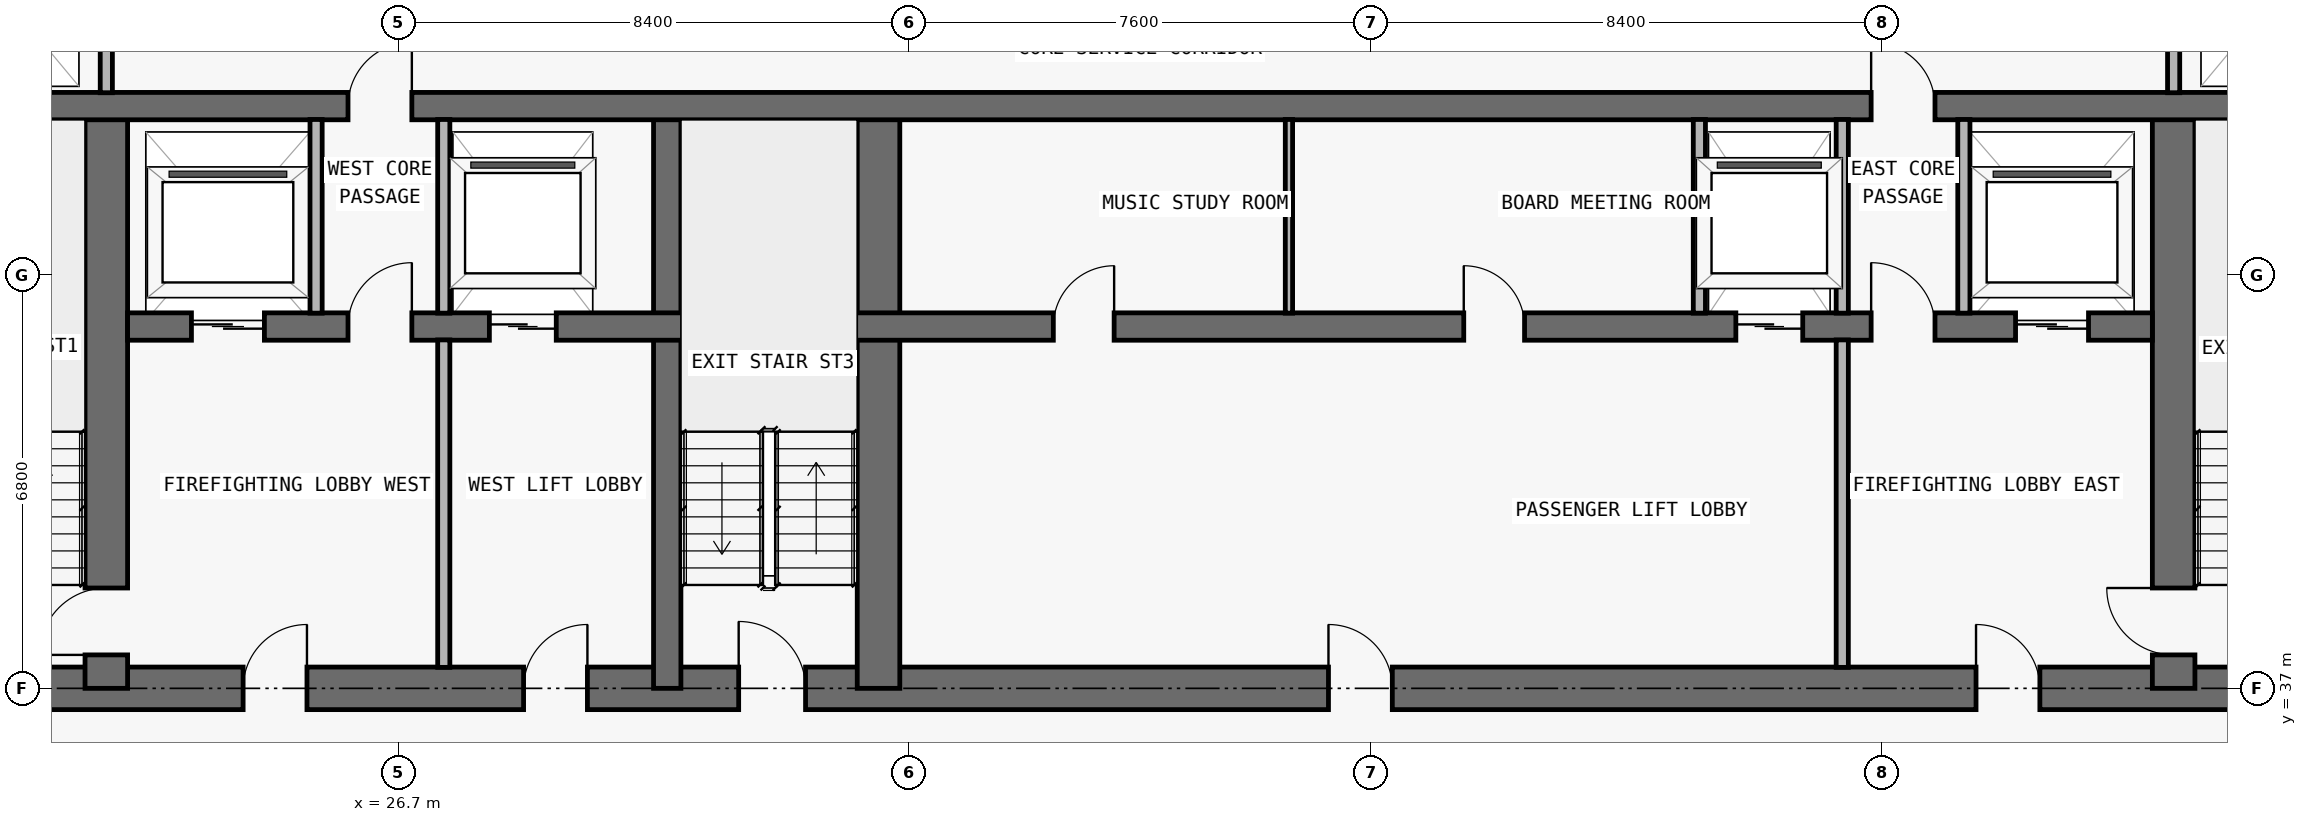
"""IFC4 building model, lengths in metres.
Left out: names, types, materials, properties, quantities, classifications, styles, units other than length and angle.
Written with IfcOpenShell. Run it as: python <this file> out.ifc"""

import sys

from ifc_helpers import new_model, si_unit, direction, frame, frame_2d, origin, place, context, subcontext, project, spatial, rectangle, extrude, element, fill, save


model = new_model("IFC4")
c1 = context("Model", 3, precision=1e-05, world=origin(), true_north=direction((0.0, 1.0)))
c2 = subcontext(c1, "Body", "Model", "MODEL_VIEW")
j1 = project(units=[si_unit("LENGTHUNIT", "METRE"), si_unit("PLANEANGLEUNIT", "RADIAN")], contexts=[c1])
p1 = place(None, origin())
s1 = spatial("IfcSite", under=j1, at=p1, CompositionType="ELEMENT")
p2 = place(p1, origin())
s2 = spatial("IfcBuilding", under=s1, at=p2, CompositionType="ELEMENT")
p3 = place(p2, frame((0.0, 0.0, 211.5)))
s3 = spatial("IfcBuildingStorey", under=s2, at=p3, CompositionType="ELEMENT", Elevation=211.5)
p4 = place(p3, frame((17.95, 37.0, 0.0), z_axis=(0.0, 0.0, 1.0), x_axis=(1.0, 0.0, 0.0)))
e1 = element("IfcWall", 1, at=p4, inside=s3, PredefinedType="SHEAR", context=c2, shape_type="SweptSolid", body=[
    extrude(rectangle(XDim=41.9, YDim=0.7, at=frame_2d((20.95, 0.0))), origin(), (0.0, 0.0, 1.0), 3.05),
])
p5 = place(p4, frame((14.35, 0.0, 0.0)))
e2 = element("IfcOpeningElement", 2, at=p5, cuts=e1, PredefinedType="OPENING", context=c2, shape_type="SweptSolid", body=[
    extrude(rectangle(XDim=1.1, YDim=2.15, at=frame_2d((0.55, 1.075))), frame((0.0, 0.36, 0.0), z_axis=(0.0, -1.0, 0.0), x_axis=(1.0, 0.0, 0.0)), (0.0, 0.0, 1.0), 0.72),
])
p6 = place(p4, frame((6.2, 0.0, 0.0)))
e3 = element("IfcOpeningElement", 3, at=p6, cuts=e1, PredefinedType="OPENING", context=c2, shape_type="SweptSolid", body=[
    extrude(rectangle(XDim=1.05, YDim=2.15, at=frame_2d((0.525, 1.075))), frame((0.0, 0.36, 0.0), z_axis=(0.0, -1.0, 0.0), x_axis=(1.0, 0.0, 0.0)), (0.0, 0.0, 1.0), 0.72),
])
p7 = place(p4, frame((34.7, 0.0, 0.0)))
e4 = element("IfcOpeningElement", 4, at=p7, cuts=e1, PredefinedType="OPENING", context=c2, shape_type="SweptSolid", body=[
    extrude(rectangle(XDim=1.05, YDim=2.15, at=frame_2d((0.525, 1.075))), frame((0.0, 0.36, 0.0), z_axis=(0.0, -1.0, 0.0), x_axis=(1.0, 0.0, 0.0)), (0.0, 0.0, 1.0), 0.72),
])
p8 = place(p4, frame((10.812, 0.0, 0.0)))
e5 = element("IfcOpeningElement", 5, at=p8, cuts=e1, PredefinedType="OPENING", context=c2, shape_type="SweptSolid", body=[
    extrude(rectangle(XDim=1.05, YDim=2.15, at=frame_2d((0.525, 1.075))), frame((0.0, 0.36, 0.0), z_axis=(0.0, -1.0, 0.0), x_axis=(1.0, 0.0, 0.0)), (0.0, 0.0, 1.0), 0.72),
])
p9 = place(p4, frame((24.05, 0.0, 0.0)))
e6 = element("IfcOpeningElement", 6, at=p9, cuts=e1, PredefinedType="OPENING", context=c2, shape_type="SweptSolid", body=[
    extrude(rectangle(XDim=1.05, YDim=2.15, at=frame_2d((0.525, 1.075))), frame((0.0, 0.36, 0.0), z_axis=(0.0, -1.0, 0.0), x_axis=(1.0, 0.0, 0.0)), (0.0, 0.0, 1.0), 0.72),
])
p10 = place(p3, frame((21.9, 37.0, 0.0), z_axis=(0.0, 0.0, 1.0), x_axis=(0.0, 1.0, 0.0)))
e7 = element("IfcWall", 7, at=p10, inside=s3, PredefinedType="SHEAR", context=c2, shape_type="SweptSolid", body=[
    extrude(rectangle(XDim=9.575, YDim=0.7, at=frame_2d((4.788, 0.0))), origin(), (0.0, 0.0, 1.0), 3.05),
])
p11 = place(p10, frame((0.55, 0.0, 0.0)))
e8 = element("IfcOpeningElement", 8, at=p11, cuts=e7, PredefinedType="OPENING", context=c2, shape_type="SweptSolid", body=[
    extrude(rectangle(XDim=1.1, YDim=2.15, at=frame_2d((0.55, 1.075))), frame((0.0, 0.36, 0.0), z_axis=(0.0, -1.0, 0.0), x_axis=(1.0, 0.0, 0.0)), (0.0, 0.0, 1.0), 0.72),
])
p12 = place(p3, frame((55.9, 37.0, 0.0), z_axis=(0.0, 0.0, 1.0), x_axis=(0.0, 1.0, 0.0)))
e9 = element("IfcWall", 9, at=p12, inside=s3, PredefinedType="SHEAR", context=c2, shape_type="SweptSolid", body=[
    extrude(rectangle(XDim=9.575, YDim=0.7, at=frame_2d((4.788, 0.0))), origin(), (0.0, 0.0, 1.0), 3.05),
])
p13 = place(p12, frame((0.55, 0.0, 0.0)))
e10 = element("IfcOpeningElement", 10, at=p13, cuts=e9, PredefinedType="OPENING", context=c2, shape_type="SweptSolid", body=[
    extrude(rectangle(XDim=1.1, YDim=2.15, at=frame_2d((0.55, 1.075))), frame((0.0, 0.36, 0.0), z_axis=(0.0, -1.0, 0.0), x_axis=(1.0, 0.0, 0.0)), (0.0, 0.0, 1.0), 0.72),
])
p14 = place(p3, frame((31.125, 37.0, 0.0), z_axis=(0.0, 0.0, 1.0), x_axis=(0.0, 1.0, 0.0)))
e11 = element("IfcWall", 11, at=p14, inside=s3, PredefinedType="SHEAR", context=c2, shape_type="SweptSolid", body=[
    extrude(rectangle(XDim=9.575, YDim=0.45, at=frame_2d((4.788, 0.0))), origin(), (0.0, 0.0, 1.0), 3.05),
])
p15 = place(p3, frame((34.6, 37.0, 0.0), z_axis=(0.0, 0.0, 1.0), x_axis=(0.0, 1.0, 0.0)))
e12 = element("IfcWall", 12, at=p15, inside=s3, PredefinedType="SHEAR", context=c2, shape_type="SweptSolid", body=[
    extrude(rectangle(XDim=9.575, YDim=0.7, at=frame_2d((4.788, 0.0))), origin(), (0.0, 0.0, 1.0), 3.05),
])
p16 = place(p3, frame((22.25, 42.95, 0.0), z_axis=(0.0, 0.0, 1.0), x_axis=(1.0, 0.0, 0.0)))
e13 = element("IfcWall", 13, at=p16, inside=s3, PredefinedType="SHEAR", context=c2, shape_type="SweptSolid", body=[
    extrude(rectangle(XDim=33.3, YDim=0.45, at=frame_2d((16.65, 0.0))), origin(), (0.0, 0.0, 1.0), 3.05),
])
p17 = place(p16, frame((1.05, 0.0, 0.0)))
e14 = element("IfcOpeningElement", 14, at=p17, cuts=e13, PredefinedType="OPENING", context=c2, shape_type="SweptSolid", body=[
    extrude(rectangle(XDim=1.2, YDim=2.2, at=frame_2d((0.6, 1.1))), frame((0.0, 0.235, 0.0), z_axis=(0.0, -1.0, 0.0), x_axis=(1.0, 0.0, 0.0)), (0.0, 0.0, 1.0), 0.47),
])
p18 = place(p16, frame((31.05, 0.0, 0.0)))
e15 = element("IfcOpeningElement", 15, at=p18, cuts=e13, PredefinedType="OPENING", context=c2, shape_type="SweptSolid", body=[
    extrude(rectangle(XDim=1.2, YDim=2.2, at=frame_2d((0.6, 1.1))), frame((0.0, 0.235, 0.0), z_axis=(0.0, -1.0, 0.0), x_axis=(1.0, 0.0, 0.0)), (0.0, 0.0, 1.0), 0.47),
])
p19 = place(p16, frame((26.45, 0.0, 0.0)))
e16 = element("IfcOpeningElement", 16, at=p19, cuts=e13, PredefinedType="OPENING", context=c2, shape_type="SweptSolid", body=[
    extrude(rectangle(XDim=1.1, YDim=2.2, at=frame_2d((0.55, 1.1))), frame((0.0, 0.235, 0.0), z_axis=(0.0, -1.0, 0.0), x_axis=(1.0, 0.0, 0.0)), (0.0, 0.0, 1.0), 0.47),
])
p20 = place(p16, frame((5.95, 0.0, 0.0)))
e17 = element("IfcOpeningElement", 17, at=p20, cuts=e13, PredefinedType="OPENING", context=c2, shape_type="SweptSolid", body=[
    extrude(rectangle(XDim=1.1, YDim=2.2, at=frame_2d((0.55, 1.1))), frame((0.0, 0.235, 0.0), z_axis=(0.0, -1.0, 0.0), x_axis=(1.0, 0.0, 0.0)), (0.0, 0.0, 1.0), 0.47),
])
p21 = place(p16, frame((3.625, 0.0, 0.0)))
e18 = element("IfcOpeningElement", 18, at=p21, cuts=e13, PredefinedType="OPENING", context=c2, shape_type="SweptSolid", body=[
    extrude(rectangle(XDim=1.05, YDim=2.15, at=frame_2d((0.525, 1.075))), frame((0.0, 0.235, 0.0), z_axis=(0.0, -1.0, 0.0), x_axis=(1.0, 0.0, 0.0)), (0.0, 0.0, 1.0), 0.47),
])
p22 = place(p16, frame((28.675, 0.0, 0.0)))
e19 = element("IfcOpeningElement", 19, at=p22, cuts=e13, PredefinedType="OPENING", context=c2, shape_type="SweptSolid", body=[
    extrude(rectangle(XDim=1.05, YDim=2.15, at=frame_2d((0.525, 1.075))), frame((0.0, 0.235, 0.0), z_axis=(0.0, -1.0, 0.0), x_axis=(1.0, 0.0, 0.0)), (0.0, 0.0, 1.0), 0.47),
])
p23 = place(p16, frame((15.225, 0.0, 0.0)))
e20 = element("IfcOpeningElement", 20, at=p23, cuts=e13, PredefinedType="OPENING", context=c2, shape_type="SweptSolid", body=[
    extrude(rectangle(XDim=1.0, YDim=2.2, at=frame_2d((0.5, 1.1))), frame((0.0, 0.235, 0.0), z_axis=(0.0, -1.0, 0.0), x_axis=(1.0, 0.0, 0.0)), (0.0, 0.0, 1.0), 0.47),
])
p24 = place(p16, frame((21.975, 0.0, 0.0)))
e21 = element("IfcOpeningElement", 21, at=p24, cuts=e13, PredefinedType="OPENING", context=c2, shape_type="SweptSolid", body=[
    extrude(rectangle(XDim=1.0, YDim=2.2, at=frame_2d((0.5, 1.1))), frame((0.0, 0.235, 0.0), z_axis=(0.0, -1.0, 0.0), x_axis=(1.0, 0.0, 0.0)), (0.0, 0.0, 1.0), 0.47),
])
p25 = place(p3, frame((18.3, 46.575, 0.0), z_axis=(0.0, 0.0, 1.0), x_axis=(1.0, 0.0, 0.0)))
e22 = element("IfcWall", 22, at=p25, inside=s3, PredefinedType="SHEAR", context=c2, shape_type="SweptSolid", body=[
    extrude(rectangle(XDim=41.2, YDim=0.45, at=frame_2d((20.6, 0.0))), origin(), (0.0, 0.0, 1.0), 3.05),
])
p26 = place(p25, frame((7.575, 0.0, 0.0)))
e23 = element("IfcOpeningElement", 23, at=p26, cuts=e22, PredefinedType="OPENING", context=c2, shape_type="SweptSolid", body=[
    extrude(rectangle(XDim=1.05, YDim=2.15, at=frame_2d((0.525, 1.075))), frame((0.0, 0.235, 0.0), z_axis=(0.0, -1.0, 0.0), x_axis=(1.0, 0.0, 0.0)), (0.0, 0.0, 1.0), 0.47),
])
p27 = place(p25, frame((32.625, 0.0, 0.0)))
e24 = element("IfcOpeningElement", 24, at=p27, cuts=e22, PredefinedType="OPENING", context=c2, shape_type="SweptSolid", body=[
    extrude(rectangle(XDim=1.05, YDim=2.15, at=frame_2d((0.525, 1.075))), frame((0.0, 0.235, 0.0), z_axis=(0.0, -1.0, 0.0), x_axis=(1.0, 0.0, 0.0)), (0.0, 0.0, 1.0), 0.47),
])
p28 = place(p3, frame((21.9, 46.795, 0.0), z_axis=(0.0, 0.0, 1.0), x_axis=(0.0, 1.0, 0.0)))
e25 = element("IfcWall", 25, at=p28, inside=s3, PredefinedType="PARTITIONING", context=c2, shape_type="SweptSolid", body=[
    extrude(rectangle(XDim=3.16, YDim=0.2, at=frame_2d((1.58, 0.0))), origin(), (0.0, 0.0, 1.0), 3.05),
])
p29 = place(p3, frame((25.35, 43.17, 0.0), z_axis=(0.0, 0.0, 1.0), x_axis=(0.0, 1.0, 0.0)))
e26 = element("IfcWall", 26, at=p29, inside=s3, PredefinedType="PARTITIONING", context=c2, shape_type="SweptSolid", body=[
    extrude(rectangle(XDim=3.185, YDim=0.2, at=frame_2d((1.593, 0.0))), origin(), (0.0, 0.0, 1.0), 3.05),
])
p30 = place(p3, frame((27.45, 37.345, 0.0), z_axis=(0.0, 0.0, 1.0), x_axis=(0.0, 1.0, 0.0)))
e27 = element("IfcWall", 27, at=p30, inside=s3, PredefinedType="PARTITIONING", context=c2, shape_type="SweptSolid", body=[
    extrude(rectangle(XDim=5.385, YDim=0.2, at=frame_2d((2.692, 0.0))), origin(), (0.0, 0.0, 1.0), 3.05),
])
p31 = place(p3, frame((27.45, 43.17, 0.0), z_axis=(0.0, 0.0, 1.0), x_axis=(0.0, 1.0, 0.0)))
e28 = element("IfcWall", 28, at=p31, inside=s3, PredefinedType="PARTITIONING", context=c2, shape_type="SweptSolid", body=[
    extrude(rectangle(XDim=3.185, YDim=0.2, at=frame_2d((1.593, 0.0))), origin(), (0.0, 0.0, 1.0), 3.05),
])
p32 = place(p3, frame((41.35, 43.17, 0.0), z_axis=(0.0, 0.0, 1.0), x_axis=(0.0, 1.0, 0.0)))
e29 = element("IfcWall", 29, at=p32, inside=s3, PredefinedType="PARTITIONING", context=c2, shape_type="SweptSolid", body=[
    extrude(rectangle(XDim=3.185, YDim=0.12, at=frame_2d((1.593, 0.0))), origin(), (0.0, 0.0, 1.0), 3.05),
])
p33 = place(p3, frame((48.1, 43.17, 0.0), z_axis=(0.0, 0.0, 1.0), x_axis=(0.0, 1.0, 0.0)))
e30 = element("IfcWall", 30, at=p33, inside=s3, PredefinedType="PARTITIONING", context=c2, shape_type="SweptSolid", body=[
    extrude(rectangle(XDim=3.185, YDim=0.2, at=frame_2d((1.593, 0.0))), origin(), (0.0, 0.0, 1.0), 3.05),
])
p34 = place(p3, frame((50.45, 37.345, 0.0), z_axis=(0.0, 0.0, 1.0), x_axis=(0.0, 1.0, 0.0)))
e31 = element("IfcWall", 31, at=p34, inside=s3, PredefinedType="PARTITIONING", context=c2, shape_type="SweptSolid", body=[
    extrude(rectangle(XDim=5.385, YDim=0.2, at=frame_2d((2.692, 0.0))), origin(), (0.0, 0.0, 1.0), 3.05),
])
for number, where, z_axis, x_axis in (
    (32, (50.45, 43.17, 0.0), (0.0, 0.0, 1.0), (0.0, 1.0, 0.0)),
    (33, (52.45, 43.17, 0.0), (0.0, 0.0, 1.0), (0.0, 1.0, 0.0)),
):
    element("IfcWall", number, at=place(p3, frame(where, z_axis=z_axis, x_axis=x_axis)), inside=s3, PredefinedType="PARTITIONING", context=c2, shape_type="SweptSolid", body=[
        extrude(rectangle(XDim=3.185, YDim=0.2, at=frame_2d((1.593, 0.0))), origin(), (0.0, 0.0, 1.0), 3.05),
    ])
p35 = place(p3, frame((55.9, 46.795, 0.0), z_axis=(0.0, 0.0, 1.0), x_axis=(0.0, 1.0, 0.0)))
e34 = element("IfcWall", 34, at=p35, inside=s3, PredefinedType="PARTITIONING", context=c2, shape_type="SweptSolid", body=[
    extrude(rectangle(XDim=3.16, YDim=0.2, at=frame_2d((1.58, 0.0))), origin(), (0.0, 0.0, 1.0), 3.05),
])
p36 = place(p17, origin())
e35 = element("IfcDoor", 35, at=p36, inside=s3, OperationType="DOUBLE_DOOR_SLIDING", PredefinedType="DOOR", context=c2, shape_type="SweptSolid", body=[
    extrude(rectangle(XDim=1.2, YDim=2.2, at=frame_2d((0.6, 1.1))), frame((0.0, 0.025, 0.0), z_axis=(0.0, -1.0, 0.0), x_axis=(1.0, 0.0, 0.0)), (0.0, 0.0, 1.0), 0.05),
])
fill(e14, e35)
p37 = place(p18, origin())
e36 = element("IfcDoor", 36, at=p37, inside=s3, OperationType="DOUBLE_DOOR_SLIDING", PredefinedType="DOOR", context=c2, shape_type="SweptSolid", body=[
    extrude(rectangle(XDim=1.2, YDim=2.2, at=frame_2d((0.6, 1.1))), frame((0.0, 0.025, 0.0), z_axis=(0.0, -1.0, 0.0), x_axis=(1.0, 0.0, 0.0)), (0.0, 0.0, 1.0), 0.05),
])
fill(e15, e36)
p38 = place(p19, origin())
e37 = element("IfcDoor", 37, at=p38, inside=s3, OperationType="DOUBLE_DOOR_SLIDING", PredefinedType="DOOR", context=c2, shape_type="SweptSolid", body=[
    extrude(rectangle(XDim=1.1, YDim=2.2, at=frame_2d((0.55, 1.1))), frame((0.0, 0.025, 0.0), z_axis=(0.0, -1.0, 0.0), x_axis=(1.0, 0.0, 0.0)), (0.0, 0.0, 1.0), 0.05),
])
fill(e16, e37)
p39 = place(p20, origin())
e38 = element("IfcDoor", 38, at=p39, inside=s3, OperationType="DOUBLE_DOOR_SLIDING", PredefinedType="DOOR", context=c2, shape_type="SweptSolid", body=[
    extrude(rectangle(XDim=1.1, YDim=2.2, at=frame_2d((0.55, 1.1))), frame((0.0, 0.025, 0.0), z_axis=(0.0, -1.0, 0.0), x_axis=(1.0, 0.0, 0.0)), (0.0, 0.0, 1.0), 0.05),
])
fill(e17, e38)
p40 = place(p5, origin())
e39 = element("IfcDoor", 39, at=p40, inside=s3, OperationType="SINGLE_SWING_LEFT", PredefinedType="DOOR", context=c2, shape_type="SweptSolid", body=[
    extrude(rectangle(XDim=1.1, YDim=2.15, at=frame_2d((0.55, 1.075))), frame((0.0, 0.025, 0.0), z_axis=(0.0, -1.0, 0.0), x_axis=(1.0, 0.0, 0.0)), (0.0, 0.0, 1.0), 0.05),
])
fill(e2, e39)
p41 = place(p6, origin())
e40 = element("IfcDoor", 40, at=p41, inside=s3, OperationType="SINGLE_SWING_RIGHT", PredefinedType="DOOR", context=c2, shape_type="SweptSolid", body=[
    extrude(rectangle(XDim=1.05, YDim=2.15, at=frame_2d((0.525, 1.075))), frame((0.0, 0.025, 0.0), z_axis=(0.0, -1.0, 0.0), x_axis=(1.0, 0.0, 0.0)), (0.0, 0.0, 1.0), 0.05),
])
fill(e3, e40)
p42 = place(p11, origin())
e41 = element("IfcDoor", 41, at=p42, inside=s3, OperationType="SINGLE_SWING_LEFT", PredefinedType="DOOR", context=c2, shape_type="SweptSolid", body=[
    extrude(rectangle(XDim=1.1, YDim=2.15, at=frame_2d((0.55, 1.075))), frame((0.0, 0.025, 0.0), z_axis=(0.0, -1.0, 0.0), x_axis=(1.0, 0.0, 0.0)), (0.0, 0.0, 1.0), 0.05),
])
fill(e8, e41)
p43 = place(p21, origin())
e42 = element("IfcDoor", 42, at=p43, inside=s3, OperationType="SINGLE_SWING_RIGHT", PredefinedType="DOOR", context=c2, shape_type="SweptSolid", body=[
    extrude(rectangle(XDim=1.05, YDim=2.15, at=frame_2d((0.525, 1.075))), frame((0.0, 0.025, 0.0), z_axis=(0.0, -1.0, 0.0), x_axis=(1.0, 0.0, 0.0)), (0.0, 0.0, 1.0), 0.05),
])
fill(e18, e42)
p44 = place(p7, origin())
e43 = element("IfcDoor", 43, at=p44, inside=s3, OperationType="SINGLE_SWING_LEFT", PredefinedType="DOOR", context=c2, shape_type="SweptSolid", body=[
    extrude(rectangle(XDim=1.05, YDim=2.15, at=frame_2d((0.525, 1.075))), frame((0.0, 0.025, 0.0), z_axis=(0.0, -1.0, 0.0), x_axis=(1.0, 0.0, 0.0)), (0.0, 0.0, 1.0), 0.05),
])
fill(e4, e43)
p45 = place(p13, origin())
e44 = element("IfcDoor", 44, at=p45, inside=s3, OperationType="SINGLE_SWING_RIGHT", PredefinedType="DOOR", context=c2, shape_type="SweptSolid", body=[
    extrude(rectangle(XDim=1.1, YDim=2.15, at=frame_2d((0.55, 1.075))), frame((0.0, 0.025, 0.0), z_axis=(0.0, -1.0, 0.0), x_axis=(1.0, 0.0, 0.0)), (0.0, 0.0, 1.0), 0.05),
])
fill(e10, e44)
p46 = place(p22, origin())
e45 = element("IfcDoor", 45, at=p46, inside=s3, OperationType="SINGLE_SWING_LEFT", PredefinedType="DOOR", context=c2, shape_type="SweptSolid", body=[
    extrude(rectangle(XDim=1.05, YDim=2.15, at=frame_2d((0.525, 1.075))), frame((0.0, 0.025, 0.0), z_axis=(0.0, -1.0, 0.0), x_axis=(1.0, 0.0, 0.0)), (0.0, 0.0, 1.0), 0.05),
])
fill(e19, e45)
p47 = place(p8, origin())
e46 = element("IfcDoor", 46, at=p47, inside=s3, OperationType="SINGLE_SWING_RIGHT", PredefinedType="DOOR", context=c2, shape_type="SweptSolid", body=[
    extrude(rectangle(XDim=1.05, YDim=2.15, at=frame_2d((0.525, 1.075))), frame((0.0, 0.025, 0.0), z_axis=(0.0, -1.0, 0.0), x_axis=(1.0, 0.0, 0.0)), (0.0, 0.0, 1.0), 0.05),
])
fill(e5, e46)
p48 = place(p9, origin())
e47 = element("IfcDoor", 47, at=p48, inside=s3, OperationType="SINGLE_SWING_LEFT", PredefinedType="DOOR", context=c2, shape_type="SweptSolid", body=[
    extrude(rectangle(XDim=1.05, YDim=2.15, at=frame_2d((0.525, 1.075))), frame((0.0, 0.025, 0.0), z_axis=(0.0, -1.0, 0.0), x_axis=(1.0, 0.0, 0.0)), (0.0, 0.0, 1.0), 0.05),
])
fill(e6, e47)
p49 = place(p23, origin())
e48 = element("IfcDoor", 48, at=p49, inside=s3, OperationType="SINGLE_SWING_RIGHT", PredefinedType="DOOR", context=c2, shape_type="SweptSolid", body=[
    extrude(rectangle(XDim=1.0, YDim=2.2, at=frame_2d((0.5, 1.1))), frame((0.0, 0.025, 0.0), z_axis=(0.0, -1.0, 0.0), x_axis=(1.0, 0.0, 0.0)), (0.0, 0.0, 1.0), 0.05),
])
fill(e20, e48)
p50 = place(p24, origin())
e49 = element("IfcDoor", 49, at=p50, inside=s3, OperationType="SINGLE_SWING_LEFT", PredefinedType="DOOR", context=c2, shape_type="SweptSolid", body=[
    extrude(rectangle(XDim=1.0, YDim=2.2, at=frame_2d((0.5, 1.1))), frame((0.0, 0.025, 0.0), z_axis=(0.0, -1.0, 0.0), x_axis=(1.0, 0.0, 0.0)), (0.0, 0.0, 1.0), 0.05),
])
fill(e21, e49)
p51 = place(p26, origin())
e50 = element("IfcDoor", 50, at=p51, inside=s3, OperationType="SINGLE_SWING_RIGHT", PredefinedType="DOOR", context=c2, shape_type="SweptSolid", body=[
    extrude(rectangle(XDim=1.05, YDim=2.15, at=frame_2d((0.525, 1.075))), frame((0.0, 0.025, 0.0), z_axis=(0.0, -1.0, 0.0), x_axis=(1.0, 0.0, 0.0)), (0.0, 0.0, 1.0), 0.05),
])
fill(e23, e50)
p52 = place(p27, origin())
e51 = element("IfcDoor", 51, at=p52, inside=s3, OperationType="SINGLE_SWING_LEFT", PredefinedType="DOOR", context=c2, shape_type="SweptSolid", body=[
    extrude(rectangle(XDim=1.05, YDim=2.15, at=frame_2d((0.525, 1.075))), frame((0.0, 0.025, 0.0), z_axis=(0.0, -1.0, 0.0), x_axis=(1.0, 0.0, 0.0)), (0.0, 0.0, 1.0), 0.05),
])
fill(e24, e51)
save(model, sys.argv[1])
